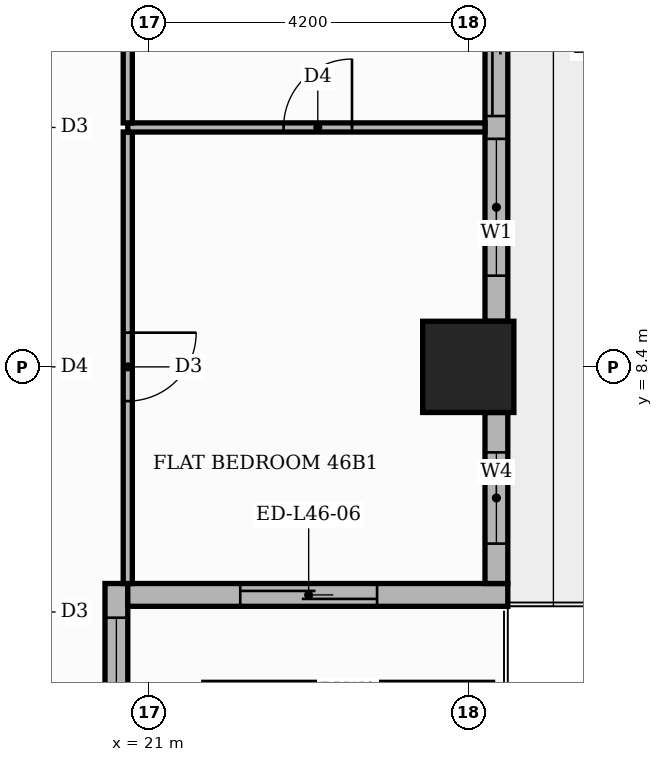
"""IFC4 building model, lengths in metres.
Left out: names, types, materials, properties, quantities, classifications, styles, units other than length and angle.
Written with IfcOpenShell. Run it as: python <this file> out.ifc"""

import sys

from ifc_helpers import new_model, si_unit, direction, frame, frame_2d, origin, origin_2d, place, context, subcontext, project, spatial, rectangle, extrude, element, fill, save


model = new_model("IFC4")
c1 = context("Model", 3, precision=1e-05, world=origin(), true_north=direction((0.0, 1.0)))
c2 = subcontext(c1, "Body", "Model", "MODEL_VIEW")
j1 = project(units=[si_unit("LENGTHUNIT", "METRE"), si_unit("PLANEANGLEUNIT", "RADIAN")], contexts=[c1])
p1 = place(None, origin())
s1 = spatial("IfcSite", under=j1, at=p1, CompositionType="ELEMENT")
p2 = place(p1, origin())
s2 = spatial("IfcBuilding", under=s1, at=p2, CompositionType="ELEMENT")
p3 = place(p2, frame((0.0, 0.0, 196.2)))
s3 = spatial("IfcBuildingStorey", under=s2, at=p3, CompositionType="ELEMENT", Elevation=196.2)
p4 = place(p3, frame((25.2, 8.4, 0.0), z_axis=(0.0, 0.0, 1.0), x_axis=(1.0, 0.0, 0.0)))
e1 = element("IfcColumn", 1, at=p4, inside=s3, PredefinedType="COLUMN", context=c2, shape_type="SweptSolid", body=[
    extrude(rectangle(XDim=1.2, YDim=1.2, at=origin_2d()), origin(), (0.0, 0.0, 1.0), 3.9),
])
p5 = place(p3, frame((20.57, -5.25, 0.0), z_axis=(0.0, 0.0, 1.0), x_axis=(0.0, 1.0, 0.0)))
e2 = element("IfcWall", 2, at=p5, inside=s3, PredefinedType="STANDARD", context=c2, shape_type="SweptSolid", body=[
    extrude(rectangle(XDim=10.8, YDim=0.3, at=frame_2d((5.4, 0.0))), origin(), (0.0, 0.0, 1.0), 3.48),
])
p6 = place(p5, frame((0.15, 0.0, 0.9)))
e3 = element("IfcOpeningElement", 3, at=p6, cuts=e2, PredefinedType="OPENING", context=c2, shape_type="SweptSolid", body=[
    extrude(rectangle(XDim=6.0, YDim=2.1, at=frame_2d((3.0, 1.05))), frame((0.0, 0.16, 0.0), z_axis=(0.0, -1.0, 0.0), x_axis=(1.0, 0.0, 0.0)), (0.0, 0.0, 1.0), 0.32),
])
p7 = place(p5, frame((6.45, 0.0, 0.9)))
e4 = element("IfcOpeningElement", 4, at=p7, cuts=e2, PredefinedType="OPENING", context=c2, shape_type="SweptSolid", body=[
    extrude(rectangle(XDim=3.9, YDim=2.1, at=frame_2d((1.95, 1.05))), frame((0.0, 0.16, 0.0), z_axis=(0.0, -1.0, 0.0), x_axis=(1.0, 0.0, 0.0)), (0.0, 0.0, 1.0), 0.32),
])
p8 = place(p3, frame((20.72, 5.4, 0.0), z_axis=(0.0, 0.0, 1.0), x_axis=(1.0, 0.0, 0.0)))
e5 = element("IfcWall", 5, at=p8, inside=s3, PredefinedType="STANDARD", context=c2, shape_type="SweptSolid", body=[
    extrude(rectangle(XDim=5.0, YDim=0.3, at=frame_2d((2.5, 0.0))), origin(), (0.0, 0.0, 1.0), 3.48),
])
p9 = place(p8, frame((1.48, 0.0, 0.0)))
e6 = element("IfcOpeningElement", 6, at=p9, cuts=e5, PredefinedType="OPENING", context=c2, shape_type="SweptSolid", body=[
    extrude(rectangle(XDim=1.8, YDim=2.4, at=frame_2d((0.9, 1.2))), frame((0.0, 0.16, 0.0), z_axis=(0.0, -1.0, 0.0), x_axis=(1.0, 0.0, 0.0)), (0.0, 0.0, 1.0), 0.32),
])
p10 = place(p3, frame((25.57, 5.55, 0.0), z_axis=(0.0, 0.0, 1.0), x_axis=(0.0, 1.0, 0.0)))
e7 = element("IfcWall", 7, at=p10, inside=s3, PredefinedType="STANDARD", context=c2, shape_type="SweptSolid", body=[
    extrude(rectangle(XDim=2.25, YDim=0.3, at=frame_2d((1.125, 0.0))), origin(), (0.0, 0.0, 1.0), 3.48),
])
p11 = place(p10, frame((0.525, 0.0, 0.9)))
e8 = element("IfcOpeningElement", 8, at=p11, cuts=e7, PredefinedType="OPENING", context=c2, shape_type="SweptSolid", body=[
    extrude(rectangle(XDim=1.2, YDim=2.1, at=frame_2d((0.6, 1.05))), frame((0.0, 0.16, 0.0), z_axis=(0.0, -1.0, 0.0), x_axis=(1.0, 0.0, 0.0)), (0.0, 0.0, 1.0), 0.32),
])
p12 = place(p3, frame((25.57, 9.0, 0.0), z_axis=(0.0, 0.0, 1.0), x_axis=(0.0, 1.0, 0.0)))
e9 = element("IfcWall", 9, at=p12, inside=s3, PredefinedType="STANDARD", context=c2, shape_type="SweptSolid", body=[
    extrude(rectangle(XDim=7.2, YDim=0.3, at=frame_2d((3.6, 0.0))), origin(), (0.0, 0.0, 1.0), 3.48),
])
p13 = place(p12, frame((0.6, 0.0, 0.9)))
e10 = element("IfcOpeningElement", 10, at=p13, cuts=e9, PredefinedType="OPENING", context=c2, shape_type="SweptSolid", body=[
    extrude(rectangle(XDim=1.8, YDim=2.1, at=frame_2d((0.9, 1.05))), frame((0.0, 0.16, 0.0), z_axis=(0.0, -1.0, 0.0), x_axis=(1.0, 0.0, 0.0)), (0.0, 0.0, 1.0), 0.32),
])
p14 = place(p12, frame((2.7, 0.0, 0.0)))
e11 = element("IfcOpeningElement", 11, at=p14, cuts=e9, PredefinedType="OPENING", context=c2, shape_type="SweptSolid", body=[
    extrude(rectangle(XDim=1.8, YDim=2.4, at=frame_2d((0.9, 1.2))), frame((0.0, 0.16, 0.0), z_axis=(0.0, -1.0, 0.0), x_axis=(1.0, 0.0, 0.0)), (0.0, 0.0, 1.0), 0.32),
])
p15 = place(p12, frame((4.8, 0.0, 0.9)))
e12 = element("IfcOpeningElement", 12, at=p15, cuts=e9, PredefinedType="OPENING", context=c2, shape_type="SweptSolid", body=[
    extrude(rectangle(XDim=1.8, YDim=2.1, at=frame_2d((0.9, 1.05))), frame((0.0, 0.16, 0.0), z_axis=(0.0, -1.0, 0.0), x_axis=(1.0, 0.0, 0.0)), (0.0, 0.0, 1.0), 0.32),
])
p16 = place(p3, frame((20.72, 5.55, 0.0), z_axis=(0.0, 0.0, 1.0), x_axis=(0.0, 1.0, 0.0)))
e13 = element("IfcWall", 13, at=p16, inside=s3, PredefinedType="PARTITIONING", context=c2, shape_type="SweptSolid", body=[
    extrude(rectangle(XDim=5.94, YDim=0.12, at=frame_2d((2.97, 0.0))), origin(), (0.0, 0.0, 1.0), 3.48),
])
p17 = place(p16, frame((2.4, 0.0, 0.0)))
e14 = element("IfcOpeningElement", 14, at=p17, cuts=e13, PredefinedType="OPENING", context=c2, shape_type="SweptSolid", body=[
    extrude(rectangle(XDim=0.9, YDim=2.1, at=frame_2d((0.45, 1.05))), frame((0.0, 0.07, 0.0), z_axis=(0.0, -1.0, 0.0), x_axis=(1.0, 0.0, 0.0)), (0.0, 0.0, 1.0), 0.14),
])
p18 = place(p3, frame((20.72, 11.55, 0.0), z_axis=(0.0, 0.0, 1.0), x_axis=(1.0, 0.0, 0.0)))
e15 = element("IfcWall", 15, at=p18, inside=s3, PredefinedType="PARTITIONING", context=c2, shape_type="SweptSolid", body=[
    extrude(rectangle(XDim=4.7, YDim=0.12, at=frame_2d((2.35, 0.0))), origin(), (0.0, 0.0, 1.0), 3.48),
])
p19 = place(p18, frame((2.05, 0.0, 0.0)))
e16 = element("IfcOpeningElement", 16, at=p19, cuts=e15, PredefinedType="OPENING", context=c2, shape_type="SweptSolid", body=[
    extrude(rectangle(XDim=0.9, YDim=2.1, at=frame_2d((0.45, 1.05))), frame((0.0, 0.07, 0.0), z_axis=(0.0, -1.0, 0.0), x_axis=(1.0, 0.0, 0.0)), (0.0, 0.0, 1.0), 0.14),
])
p20 = place(p3, frame((20.72, 11.61, 0.0), z_axis=(0.0, 0.0, 1.0), x_axis=(0.0, 1.0, 0.0)))
e17 = element("IfcWall", 17, at=p20, inside=s3, PredefinedType="PARTITIONING", context=c2, shape_type="SweptSolid", body=[
    extrude(rectangle(XDim=1.94, YDim=0.12, at=frame_2d((0.97, 0.0))), origin(), (0.0, 0.0, 1.0), 3.48),
])
p21 = place(p7, origin())
e18 = element("IfcWindow", 18, at=p21, inside=s3, PartitioningType="SINGLE_PANEL", PredefinedType="WINDOW", context=c2, shape_type="SweptSolid", body=[
    extrude(rectangle(XDim=3.9, YDim=2.1, at=frame_2d((1.95, 1.05))), frame((0.0, 0.03, 0.0), z_axis=(0.0, -1.0, 0.0), x_axis=(1.0, 0.0, 0.0)), (0.0, 0.0, 1.0), 0.06),
])
fill(e4, e18)
p22 = place(p9, origin())
e19 = element("IfcDoor", 19, at=p22, inside=s3, OperationType="SLIDING_TO_RIGHT", PredefinedType="DOOR", context=c2, shape_type="SweptSolid", body=[
    extrude(rectangle(XDim=1.8, YDim=2.4, at=frame_2d((0.9, 1.2))), frame((0.0, 0.025, 0.0), z_axis=(0.0, -1.0, 0.0), x_axis=(1.0, 0.0, 0.0)), (0.0, 0.0, 1.0), 0.05),
])
fill(e6, e19)
p23 = place(p11, origin())
e20 = element("IfcWindow", 20, at=p23, inside=s3, PartitioningType="SINGLE_PANEL", PredefinedType="WINDOW", context=c2, shape_type="SweptSolid", body=[
    extrude(rectangle(XDim=1.2, YDim=2.1, at=frame_2d((0.6, 1.05))), frame((0.0, 0.03, 0.0), z_axis=(0.0, -1.0, 0.0), x_axis=(1.0, 0.0, 0.0)), (0.0, 0.0, 1.0), 0.06),
])
fill(e8, e20)
p24 = place(p13, origin())
e21 = element("IfcWindow", 21, at=p24, inside=s3, PartitioningType="SINGLE_PANEL", PredefinedType="WINDOW", context=c2, shape_type="SweptSolid", body=[
    extrude(rectangle(XDim=1.8, YDim=2.1, at=frame_2d((0.9, 1.05))), frame((0.0, 0.03, 0.0), z_axis=(0.0, -1.0, 0.0), x_axis=(1.0, 0.0, 0.0)), (0.0, 0.0, 1.0), 0.06),
])
fill(e10, e21)
p25 = place(p14, origin())
e22 = element("IfcDoor", 22, at=p25, inside=s3, OperationType="SLIDING_TO_RIGHT", PredefinedType="DOOR", context=c2, shape_type="SweptSolid", body=[
    extrude(rectangle(XDim=1.8, YDim=2.4, at=frame_2d((0.9, 1.2))), frame((0.0, 0.025, 0.0), z_axis=(0.0, -1.0, 0.0), x_axis=(1.0, 0.0, 0.0)), (0.0, 0.0, 1.0), 0.05),
])
fill(e11, e22)
p26 = place(p17, frame((0.9, 0.0, 0.0), z_axis=(0.0, 0.0, 1.0), x_axis=(-1.0, 0.0, 0.0)))
e23 = element("IfcDoor", 23, at=p26, inside=s3, OperationType="SINGLE_SWING_RIGHT", PredefinedType="DOOR", context=c2, shape_type="SweptSolid", body=[
    extrude(rectangle(XDim=0.9, YDim=2.1, at=frame_2d((0.45, 1.05))), frame((0.0, 0.025, 0.0), z_axis=(0.0, -1.0, 0.0), x_axis=(1.0, 0.0, 0.0)), (0.0, 0.0, 1.0), 0.05),
])
fill(e14, e23)
p27 = place(p19, origin())
e24 = element("IfcDoor", 24, at=p27, inside=s3, OperationType="SINGLE_SWING_RIGHT", PredefinedType="DOOR", context=c2, shape_type="SweptSolid", body=[
    extrude(rectangle(XDim=0.9, YDim=2.1, at=frame_2d((0.45, 1.05))), frame((0.0, 0.025, 0.0), z_axis=(0.0, -1.0, 0.0), x_axis=(1.0, 0.0, 0.0)), (0.0, 0.0, 1.0), 0.05),
])
fill(e16, e24)
save(model, sys.argv[1])
